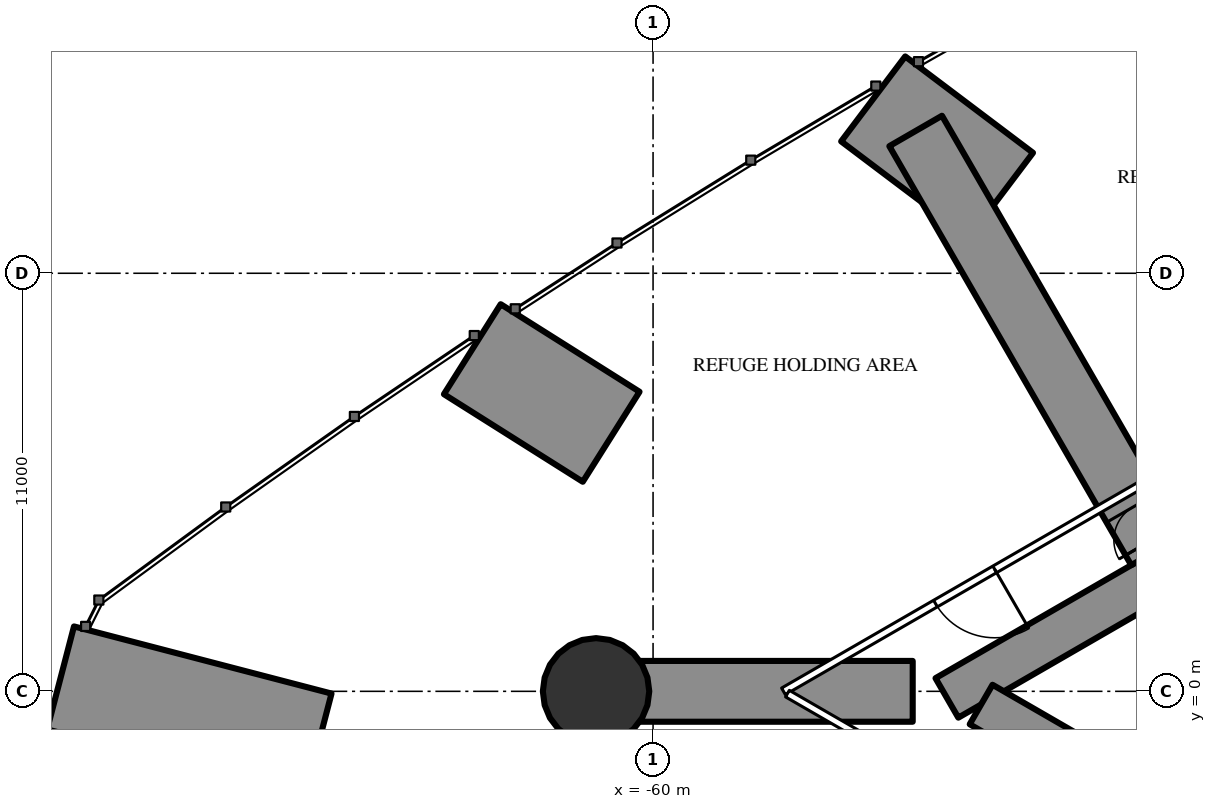
"""IFC4 building model, lengths in metres.
Left out: names, types, materials, properties, quantities, classifications, styles, units other than length and angle.
Written with IfcOpenShell. Run it as: python <this file> out.ifc"""

import sys

from ifc_helpers import new_model, si_unit, direction, frame, frame_2d, origin, origin_2d, place, context, subcontext, project, spatial, rectangle, hollow_circle, extrude, element, fill, save


model = new_model("IFC4")
c1 = context("Model", 3, precision=1e-05, world=origin(), true_north=direction((0.0, 1.0)))
c2 = subcontext(c1, "Body", "Model", "MODEL_VIEW")
j1 = project(units=[si_unit("LENGTHUNIT", "METRE"), si_unit("PLANEANGLEUNIT", "RADIAN")], contexts=[c1])
p1 = place(None, origin())
s1 = spatial("IfcSite", under=j1, at=p1, CompositionType="ELEMENT")
p2 = place(p1, origin())
s2 = spatial("IfcBuilding", under=s1, at=p2, CompositionType="ELEMENT")
p3 = place(p2, frame((0.0, 0.0, 81.0)))
s3 = spatial("IfcBuildingStorey", under=s2, at=p3, CompositionType="ELEMENT", Elevation=81.0)
p4 = place(p3, frame((-75.59, 0.353, 0.0), z_axis=(0.0, 0.0, 1.0), x_axis=(0.967676481034, -0.252194821623, 0.0)))
e1 = element("IfcWall", 1, at=p4, inside=s3, PredefinedType="SHEAR", context=c2, shape_type="SweptSolid", body=[
    extrude(rectangle(XDim=7.003, YDim=2.8, at=frame_2d((3.501, 0.0))), origin(), (0.0, 0.0, 1.0), 6.0),
])
p5 = place(p3, frame((-54.208, 15.588, 0.0), z_axis=(0.0, 0.0, 1.0), x_axis=(0.798432065831, -0.602084907843, 0.0)))
e2 = element("IfcWall", 2, at=p5, inside=s3, PredefinedType="SHEAR", context=c2, shape_type="SweptSolid", body=[
    extrude(rectangle(XDim=4.211, YDim=2.8, at=frame_2d((2.106, 0.0))), origin(), (0.0, 0.0, 1.0), 6.0),
])
p6 = place(p3, frame((-64.756, 9.002, 0.0), z_axis=(0.0, 0.0, 1.0), x_axis=(0.845851319887, -0.533418732934, 0.0)))
e3 = element("IfcWall", 3, at=p6, inside=s3, PredefinedType="SHEAR", context=c2, shape_type="SweptSolid", body=[
    extrude(rectangle(XDim=4.32, YDim=2.8, at=frame_2d((2.16, 0.0))), origin(), (0.0, 0.0, 1.0), 6.0),
])
p7 = place(p3, frame((-61.5, 0.0, 0.0), z_axis=(0.0, 0.0, 1.0), x_axis=(1.0, 0.0, 0.0)))
e4 = element("IfcColumn", 4, at=p7, inside=s3, PredefinedType="COLUMN", context=c2, shape_type="SweptSolid", body=[
    extrude(hollow_circle(Radius=1.4, WallThickness=0.1, at=origin_2d()), origin(), (0.0, 0.0, 1.0), 6.0),
])
p8 = place(p3, frame((-27.2, 14.3, 0.0), z_axis=(0.0, 0.0, 1.0), x_axis=(-0.866026593062, -0.499997940104, 0.0)))
e5 = element("IfcWall", 5, at=p8, inside=s3, PredefinedType="SHEAR", context=c2, shape_type="SweptSolid", body=[
    extrude(rectangle(XDim=28.946, YDim=1.2, at=frame_2d((14.473, 0.0))), origin(), (0.0, 0.0, 1.0), 6.0),
])
p9 = place(p8, frame((4.6, 0.0, 0.0)))
e6 = element("IfcOpeningElement", 6, at=p9, cuts=e5, PredefinedType="OPENING", context=c2, shape_type="SweptSolid", body=[
    extrude(rectangle(XDim=1.0, YDim=2.2, at=frame_2d((0.5, 1.1))), frame((0.0, 0.61, 0.0), z_axis=(0.0, -1.0, 0.0), x_axis=(1.0, 0.0, 0.0)), (0.0, 0.0, 1.0), 1.22),
])
p10 = place(p8, frame((13.568, 0.0, 0.0)))
e7 = element("IfcOpeningElement", 7, at=p10, cuts=e5, PredefinedType="OPENING", context=c2, shape_type="SweptSolid", body=[
    extrude(rectangle(XDim=1.8, YDim=2.2, at=frame_2d((0.9, 1.1))), frame((0.0, 0.61, 0.0), z_axis=(0.0, -1.0, 0.0), x_axis=(1.0, 0.0, 0.0)), (0.0, 0.0, 1.0), 1.22),
])
p11 = place(p3, frame((-27.2, -14.3, 0.0), z_axis=(0.0, 0.0, 1.0), x_axis=(-0.866024021859, 0.500002393557, 0.0)))
e8 = element("IfcWall", 8, at=p11, inside=s3, PredefinedType="SHEAR", context=c2, shape_type="SweptSolid", body=[
    extrude(rectangle(XDim=27.907, YDim=1.2, at=frame_2d((13.954, 0.0))), origin(), (0.0, 0.0, 1.0), 6.0),
])
p12 = place(p11, frame((4.6, 0.0, 0.0)))
e9 = element("IfcOpeningElement", 9, at=p12, cuts=e8, PredefinedType="OPENING", context=c2, shape_type="SweptSolid", body=[
    extrude(rectangle(XDim=1.0, YDim=2.2, at=frame_2d((0.5, 1.1))), frame((0.0, 0.61, 0.0), z_axis=(0.0, -1.0, 0.0), x_axis=(1.0, 0.0, 0.0)), (0.0, 0.0, 1.0), 1.22),
])
p13 = place(p11, frame((13.568, 0.0, 0.0)))
e10 = element("IfcOpeningElement", 10, at=p13, cuts=e8, PredefinedType="OPENING", context=c2, shape_type="SweptSolid", body=[
    extrude(rectangle(XDim=1.8, YDim=2.2, at=frame_2d((0.9, 1.1))), frame((0.0, 0.61, 0.0), z_axis=(0.0, -1.0, 0.0), x_axis=(1.0, 0.0, 0.0)), (0.0, 0.0, 1.0), 1.22),
])
p14 = place(p3, frame((-46.725, 3.72, 0.0), z_axis=(0.0, 0.0, 1.0), x_axis=(-0.500000237956, 0.866025266401, 0.0)))
e11 = element("IfcWall", 11, at=p14, inside=s3, PredefinedType="SHEAR", context=c2, shape_type="SweptSolid", body=[
    extrude(rectangle(XDim=12.73, YDim=1.6, at=frame_2d((6.365, 0.0))), origin(), (0.0, 0.0, 1.0), 6.0),
])
p15 = place(p14, frame((0.3, 0.0, 0.0)))
e12 = element("IfcOpeningElement", 12, at=p15, cuts=e11, PredefinedType="OPENING", context=c2, shape_type="SweptSolid", body=[
    extrude(rectangle(XDim=1.0, YDim=2.2, at=frame_2d((0.5, 1.1))), frame((0.0, 0.81, 0.0), z_axis=(0.0, -1.0, 0.0), x_axis=(1.0, 0.0, 0.0)), (0.0, 0.0, 1.0), 1.62),
])
p16 = place(p3, frame((-53.168, 0.0, 0.0), z_axis=(0.0, 0.0, 1.0), x_axis=(-1.0, 0.0, 0.0)))
e13 = element("IfcWall", 13, at=p16, inside=s3, PredefinedType="SHEAR", context=c2, shape_type="SweptSolid", body=[
    extrude(rectangle(XDim=8.332, YDim=1.6, at=frame_2d((4.166, 0.0))), origin(), (0.0, 0.0, 1.0), 6.0),
])
p17 = place(p3, frame((-37.7, 10.894, 0.0), z_axis=(0.0, 0.0, 1.0), x_axis=(-0.866027905338, -0.499995667157, 0.0)))
e14 = element("IfcWall", 14, at=p17, inside=s3, PredefinedType="PARTITIONING", context=c2, shape_type="SweptSolid", body=[
    extrude(rectangle(XDim=21.787, YDim=0.2, at=frame_2d((10.894, 0.0))), origin(), (0.0, 0.0, 1.0), 5.75),
])
p18 = place(p17, frame((15.369, 0.0, 0.0)))
e15 = element("IfcOpeningElement", 15, at=p18, cuts=e14, PredefinedType="OPENING", context=c2, shape_type="SweptSolid", body=[
    extrude(rectangle(XDim=1.8, YDim=2.2, at=frame_2d((0.9, 1.1))), frame((0.0, 0.11, 0.0), z_axis=(0.0, -1.0, 0.0), x_axis=(1.0, 0.0, 0.0)), (0.0, 0.0, 1.0), 0.22),
])
p19 = place(p17, frame((4.476, 0.0, 0.0)))
e16 = element("IfcOpeningElement", 16, at=p19, cuts=e14, PredefinedType="OPENING", context=c2, shape_type="SweptSolid", body=[
    extrude(rectangle(XDim=1.8, YDim=2.2, at=frame_2d((0.9, 1.1))), frame((0.0, 0.11, 0.0), z_axis=(0.0, -1.0, 0.0), x_axis=(1.0, 0.0, 0.0)), (0.0, 0.0, 1.0), 0.22),
])
p20 = place(p3, frame((-36.92, -11.344, 0.0), z_axis=(0.0, 0.0, 1.0), x_axis=(-0.866028313256, 0.499994960614, 0.0)))
e17 = element("IfcWall", 17, at=p20, inside=s3, PredefinedType="PARTITIONING", context=c2, shape_type="SweptSolid", body=[
    extrude(rectangle(XDim=22.568, YDim=0.2, at=frame_2d((11.284, 0.0))), origin(), (0.0, 0.0, 1.0), 5.75),
])
p21 = place(p20, frame((16.27, 0.0, 0.0)))
e18 = element("IfcOpeningElement", 18, at=p21, cuts=e17, PredefinedType="OPENING", context=c2, shape_type="SweptSolid", body=[
    extrude(rectangle(XDim=1.8, YDim=2.2, at=frame_2d((0.9, 1.1))), frame((0.0, 0.11, 0.0), z_axis=(0.0, -1.0, 0.0), x_axis=(1.0, 0.0, 0.0)), (0.0, 0.0, 1.0), 0.22),
])
p22 = place(p20, frame((4.826, 0.0, 0.0)))
e19 = element("IfcOpeningElement", 19, at=p22, cuts=e17, PredefinedType="OPENING", context=c2, shape_type="SweptSolid", body=[
    extrude(rectangle(XDim=2.0, YDim=2.4, at=frame_2d((1.0, 1.2))), frame((0.0, 0.11, 0.0), z_axis=(0.0, -1.0, 0.0), x_axis=(1.0, 0.0, 0.0)), (0.0, 0.0, 1.0), 0.22),
])
p23 = place(p15, origin())
e20 = element("IfcDoor", 20, at=p23, inside=s3, OperationType="SINGLE_SWING_LEFT", PredefinedType="DOOR", context=c2, shape_type="SweptSolid", body=[
    extrude(rectangle(XDim=1.0, YDim=2.2, at=frame_2d((0.5, 1.1))), frame((0.0, 0.025, 0.0), z_axis=(0.0, -1.0, 0.0), x_axis=(1.0, 0.0, 0.0)), (0.0, 0.0, 1.0), 0.05),
])
fill(e12, e20)
p24 = place(p18, origin())
e21 = element("IfcDoor", 21, at=p24, inside=s3, OperationType="DOUBLE_DOOR_SINGLE_SWING", PredefinedType="DOOR", context=c2, shape_type="SweptSolid", body=[
    extrude(rectangle(XDim=1.8, YDim=2.2, at=frame_2d((0.9, 1.1))), frame((0.0, 0.025, 0.0), z_axis=(0.0, -1.0, 0.0), x_axis=(1.0, 0.0, 0.0)), (0.0, 0.0, 1.0), 0.05),
])
fill(e15, e21)
save(model, sys.argv[1])
